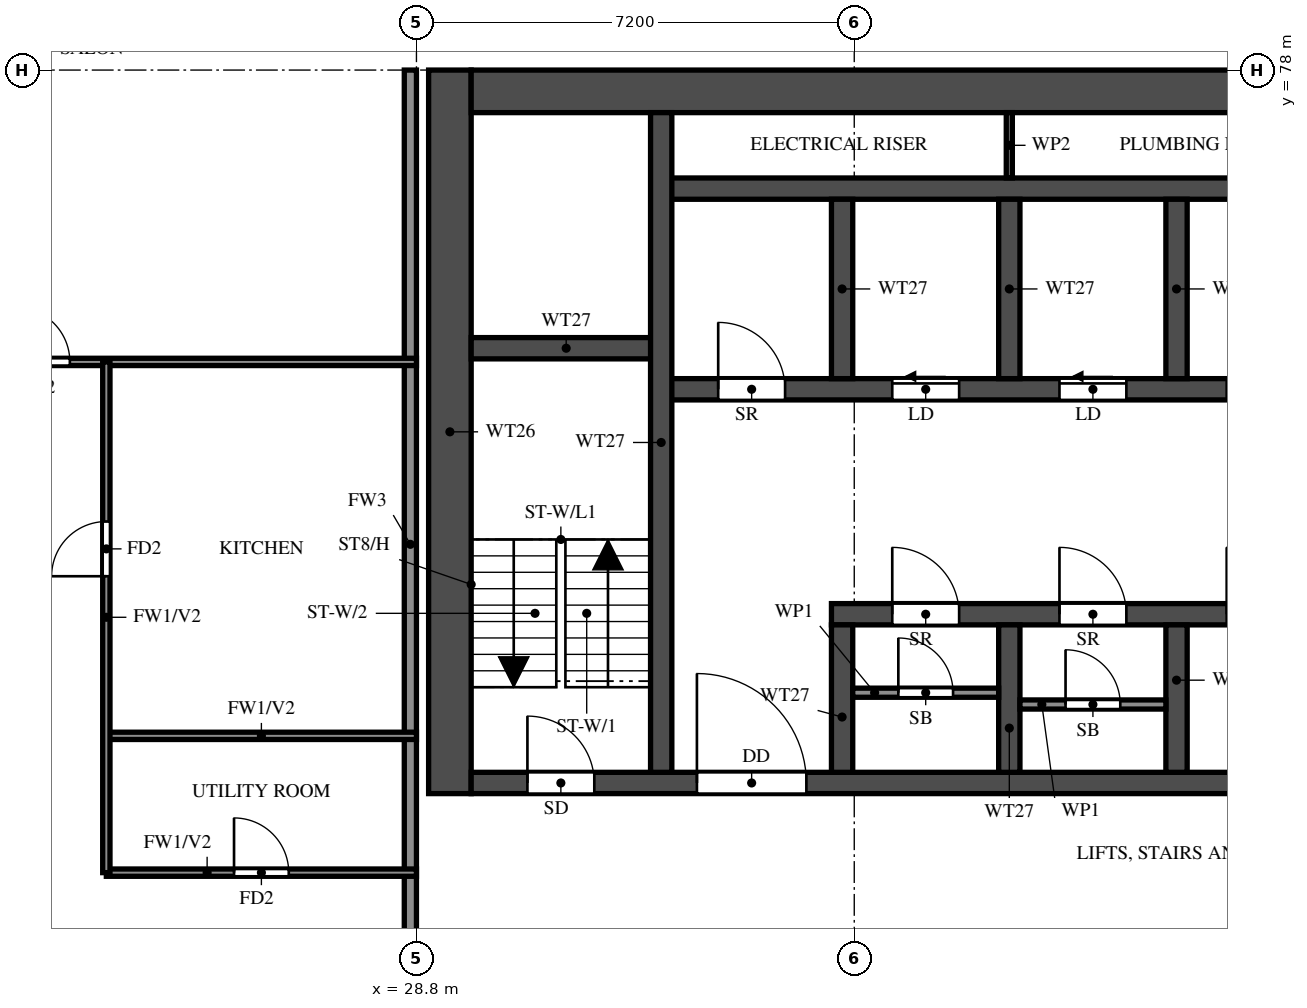
"""IFC4 building model, lengths in metres.
Left out: names, types, materials, properties, quantities, classifications, styles, units other than length and angle.
Written with IfcOpenShell. Run it as: python <this file> out.ifc"""

import sys

from ifc_helpers import new_model, si_unit, direction, frame, frame_2d, origin, place, context, subcontext, project, spatial, rectangle, extrude, element, fill, save


model = new_model("IFC4")
c1 = context("Model", 3, precision=1e-05, world=origin(), true_north=direction((0.0, 1.0)))
c2 = subcontext(c1, "Body", "Model", "MODEL_VIEW")
j1 = project(units=[si_unit("LENGTHUNIT", "METRE"), si_unit("PLANEANGLEUNIT", "RADIAN")], contexts=[c1])
p1 = place(None, origin())
s1 = spatial("IfcSite", under=j1, at=p1, CompositionType="ELEMENT")
p2 = place(p1, origin())
s2 = spatial("IfcBuilding", under=s1, at=p2, CompositionType="ELEMENT")
p3 = place(p2, frame((0.0, 0.0, 146.5)))
s3 = spatial("IfcBuildingStorey", under=s2, at=p3, CompositionType="ELEMENT", Elevation=146.5)
p4 = place(p3, frame((29.35, 66.1, 0.0), z_axis=(0.0, 0.0, 1.0), x_axis=(0.0, 1.0, 0.0)))
e1 = element("IfcWall", 1, at=p4, inside=s3, PredefinedType="SHEAR", context=c2, shape_type="SweptSolid", body=[
    extrude(rectangle(XDim=11.9, YDim=0.7, at=frame_2d((5.95, 0.0))), origin(), (0.0, 0.0, 1.0), 3.2),
])
p5 = place(p3, frame((29.7, 77.65, 0.0), z_axis=(0.0, 0.0, 1.0), x_axis=(1.0, 0.0, 0.0)))
e2 = element("IfcWall", 2, at=p5, inside=s3, PredefinedType="SHEAR", context=c2, shape_type="SweptSolid", body=[
    extrude(rectangle(XDim=41.4, YDim=0.7, at=frame_2d((20.7, 0.0))), origin(), (0.0, 0.0, 1.0), 3.2),
])
p6 = place(p3, frame((29.7, 66.275, 0.0), z_axis=(0.0, 0.0, 1.0), x_axis=(1.0, 0.0, 0.0)))
e3 = element("IfcWall", 3, at=p6, inside=s3, PredefinedType="SHEAR", context=c2, shape_type="SweptSolid", body=[
    extrude(rectangle(XDim=41.4, YDim=0.35, at=frame_2d((20.7, 0.0))), origin(), (0.0, 0.0, 1.0), 3.2),
])
p7 = place(p6, frame((0.925, 0.0, 0.0)))
e4 = element("IfcOpeningElement", 4, at=p7, cuts=e3, PredefinedType="OPENING", context=c2, shape_type="SweptSolid", body=[
    extrude(rectangle(XDim=1.1, YDim=2.1, at=frame_2d((0.55, 1.05))), frame((0.0, 0.185, 0.0), z_axis=(0.0, -1.0, 0.0), x_axis=(1.0, 0.0, 0.0)), (0.0, 0.0, 1.0), 0.37),
])
p8 = place(p6, frame((3.712, 0.0, 0.0)))
e5 = element("IfcOpeningElement", 5, at=p8, cuts=e3, PredefinedType="OPENING", context=c2, shape_type="SweptSolid", body=[
    extrude(rectangle(XDim=1.8, YDim=2.1, at=frame_2d((0.9, 1.05))), frame((0.0, 0.185, 0.0), z_axis=(0.0, -1.0, 0.0), x_axis=(1.0, 0.0, 0.0)), (0.0, 0.0, 1.0), 0.37),
])
p9 = place(p3, frame((35.625, 69.05, 0.0), z_axis=(0.0, 0.0, 1.0), x_axis=(1.0, 0.0, 0.0)))
e6 = element("IfcWall", 6, at=p9, inside=s3, PredefinedType="SHEAR", context=c2, shape_type="SweptSolid", body=[
    extrude(rectangle(XDim=24.1, YDim=0.35, at=frame_2d((12.05, 0.0))), origin(), (0.0, 0.0, 1.0), 3.2),
])
p10 = place(p9, frame((1.0, 0.0, 0.0)))
e7 = element("IfcOpeningElement", 7, at=p10, cuts=e6, PredefinedType="OPENING", context=c2, shape_type="SweptSolid", body=[
    extrude(rectangle(XDim=1.1, YDim=2.1, at=frame_2d((0.55, 1.05))), frame((0.0, 0.185, 0.0), z_axis=(0.0, -1.0, 0.0), x_axis=(1.0, 0.0, 0.0)), (0.0, 0.0, 1.0), 0.37),
])
p11 = place(p9, frame((3.75, 0.0, 0.0)))
e8 = element("IfcOpeningElement", 8, at=p11, cuts=e6, PredefinedType="OPENING", context=c2, shape_type="SweptSolid", body=[
    extrude(rectangle(XDim=1.1, YDim=2.1, at=frame_2d((0.55, 1.05))), frame((0.0, 0.185, 0.0), z_axis=(0.0, -1.0, 0.0), x_axis=(1.0, 0.0, 0.0)), (0.0, 0.0, 1.0), 0.37),
])
p12 = place(p9, frame((6.5, 0.0, 0.0)))
e9 = element("IfcOpeningElement", 9, at=p12, cuts=e6, PredefinedType="OPENING", context=c2, shape_type="SweptSolid", body=[
    extrude(rectangle(XDim=1.1, YDim=2.1, at=frame_2d((0.55, 1.05))), frame((0.0, 0.185, 0.0), z_axis=(0.0, -1.0, 0.0), x_axis=(1.0, 0.0, 0.0)), (0.0, 0.0, 1.0), 0.37),
])
p13 = place(p9, frame((9.25, 0.0, 0.0)))
e10 = element("IfcOpeningElement", 10, at=p13, cuts=e6, PredefinedType="OPENING", context=c2, shape_type="SweptSolid", body=[
    extrude(rectangle(XDim=1.1, YDim=2.1, at=frame_2d((0.55, 1.05))), frame((0.0, 0.185, 0.0), z_axis=(0.0, -1.0, 0.0), x_axis=(1.0, 0.0, 0.0)), (0.0, 0.0, 1.0), 0.37),
])
p14 = place(p9, frame((12.0, 0.0, 0.0)))
e11 = element("IfcOpeningElement", 11, at=p14, cuts=e6, PredefinedType="OPENING", context=c2, shape_type="SweptSolid", body=[
    extrude(rectangle(XDim=1.1, YDim=2.1, at=frame_2d((0.55, 1.05))), frame((0.0, 0.185, 0.0), z_axis=(0.0, -1.0, 0.0), x_axis=(1.0, 0.0, 0.0)), (0.0, 0.0, 1.0), 0.37),
])
p15 = place(p9, frame((14.75, 0.0, 0.0)))
e12 = element("IfcOpeningElement", 12, at=p15, cuts=e6, PredefinedType="OPENING", context=c2, shape_type="SweptSolid", body=[
    extrude(rectangle(XDim=1.1, YDim=2.1, at=frame_2d((0.55, 1.05))), frame((0.0, 0.185, 0.0), z_axis=(0.0, -1.0, 0.0), x_axis=(1.0, 0.0, 0.0)), (0.0, 0.0, 1.0), 0.37),
])
p16 = place(p9, frame((17.625, 0.0, 0.0)))
e13 = element("IfcOpeningElement", 13, at=p16, cuts=e6, PredefinedType="OPENING", context=c2, shape_type="SweptSolid", body=[
    extrude(rectangle(XDim=1.1, YDim=2.1, at=frame_2d((0.55, 1.05))), frame((0.0, 0.185, 0.0), z_axis=(0.0, -1.0, 0.0), x_axis=(1.0, 0.0, 0.0)), (0.0, 0.0, 1.0), 0.37),
])
p17 = place(p9, frame((20.625, 0.0, 0.0)))
e14 = element("IfcOpeningElement", 14, at=p17, cuts=e6, PredefinedType="OPENING", context=c2, shape_type="SweptSolid", body=[
    extrude(rectangle(XDim=1.1, YDim=2.1, at=frame_2d((0.55, 1.05))), frame((0.0, 0.185, 0.0), z_axis=(0.0, -1.0, 0.0), x_axis=(1.0, 0.0, 0.0)), (0.0, 0.0, 1.0), 0.37),
])
p18 = place(p3, frame((32.825, 72.75, 0.0), z_axis=(0.0, 0.0, 1.0), x_axis=(1.0, 0.0, 0.0)))
e15 = element("IfcWall", 15, at=p18, inside=s3, PredefinedType="SHEAR", context=c2, shape_type="SweptSolid", body=[
    extrude(rectangle(XDim=35.15, YDim=0.35, at=frame_2d((17.575, 0.0))), origin(), (0.0, 0.0, 1.0), 3.2),
])
p19 = place(p18, frame((19.8, 0.0, 0.0)))
e16 = element("IfcOpeningElement", 16, at=p19, cuts=e15, PredefinedType="OPENING", context=c2, shape_type="SweptSolid", body=[
    extrude(rectangle(XDim=1.1, YDim=2.1, at=frame_2d((0.55, 1.05))), frame((0.0, 0.185, 0.0), z_axis=(0.0, -1.0, 0.0), x_axis=(1.0, 0.0, 0.0)), (0.0, 0.0, 1.0), 0.37),
])
p20 = place(p18, frame((27.7, 0.0, 0.0)))
e17 = element("IfcOpeningElement", 17, at=p20, cuts=e15, PredefinedType="OPENING", context=c2, shape_type="SweptSolid", body=[
    extrude(rectangle(XDim=1.1, YDim=2.1, at=frame_2d((0.55, 1.05))), frame((0.0, 0.185, 0.0), z_axis=(0.0, -1.0, 0.0), x_axis=(1.0, 0.0, 0.0)), (0.0, 0.0, 1.0), 0.37),
])
p21 = place(p18, frame((30.3, 0.0, 0.0)))
e18 = element("IfcOpeningElement", 18, at=p21, cuts=e15, PredefinedType="OPENING", context=c2, shape_type="SweptSolid", body=[
    extrude(rectangle(XDim=1.1, YDim=2.1, at=frame_2d((0.55, 1.05))), frame((0.0, 0.185, 0.0), z_axis=(0.0, -1.0, 0.0), x_axis=(1.0, 0.0, 0.0)), (0.0, 0.0, 1.0), 0.37),
])
p22 = place(p18, frame((3.8, 0.0, 0.0)))
e19 = element("IfcOpeningElement", 19, at=p22, cuts=e15, PredefinedType="OPENING", context=c2, shape_type="SweptSolid", body=[
    extrude(rectangle(XDim=1.1, YDim=2.1, at=frame_2d((0.55, 1.05))), frame((0.0, 0.185, 0.0), z_axis=(0.0, -1.0, 0.0), x_axis=(1.0, 0.0, 0.0)), (0.0, 0.0, 1.0), 0.37),
])
p23 = place(p18, frame((6.55, 0.0, 0.0)))
e20 = element("IfcOpeningElement", 20, at=p23, cuts=e15, PredefinedType="OPENING", context=c2, shape_type="SweptSolid", body=[
    extrude(rectangle(XDim=1.1, YDim=2.1, at=frame_2d((0.55, 1.05))), frame((0.0, 0.185, 0.0), z_axis=(0.0, -1.0, 0.0), x_axis=(1.0, 0.0, 0.0)), (0.0, 0.0, 1.0), 0.37),
])
p24 = place(p18, frame((9.3, 0.0, 0.0)))
e21 = element("IfcOpeningElement", 21, at=p24, cuts=e15, PredefinedType="OPENING", context=c2, shape_type="SweptSolid", body=[
    extrude(rectangle(XDim=1.1, YDim=2.1, at=frame_2d((0.55, 1.05))), frame((0.0, 0.185, 0.0), z_axis=(0.0, -1.0, 0.0), x_axis=(1.0, 0.0, 0.0)), (0.0, 0.0, 1.0), 0.37),
])
p25 = place(p18, frame((12.05, 0.0, 0.0)))
e22 = element("IfcOpeningElement", 22, at=p25, cuts=e15, PredefinedType="OPENING", context=c2, shape_type="SweptSolid", body=[
    extrude(rectangle(XDim=1.1, YDim=2.1, at=frame_2d((0.55, 1.05))), frame((0.0, 0.185, 0.0), z_axis=(0.0, -1.0, 0.0), x_axis=(1.0, 0.0, 0.0)), (0.0, 0.0, 1.0), 0.37),
])
p26 = place(p18, frame((14.8, 0.0, 0.0)))
e23 = element("IfcOpeningElement", 23, at=p26, cuts=e15, PredefinedType="OPENING", context=c2, shape_type="SweptSolid", body=[
    extrude(rectangle(XDim=1.1, YDim=2.1, at=frame_2d((0.55, 1.05))), frame((0.0, 0.185, 0.0), z_axis=(0.0, -1.0, 0.0), x_axis=(1.0, 0.0, 0.0)), (0.0, 0.0, 1.0), 0.37),
])
p27 = place(p18, frame((17.55, 0.0, 0.0)))
e24 = element("IfcOpeningElement", 24, at=p27, cuts=e15, PredefinedType="OPENING", context=c2, shape_type="SweptSolid", body=[
    extrude(rectangle(XDim=1.1, YDim=2.1, at=frame_2d((0.55, 1.05))), frame((0.0, 0.185, 0.0), z_axis=(0.0, -1.0, 0.0), x_axis=(1.0, 0.0, 0.0)), (0.0, 0.0, 1.0), 0.37),
])
p28 = place(p18, frame((0.938, 0.0, 0.0)))
e25 = element("IfcOpeningElement", 25, at=p28, cuts=e15, PredefinedType="OPENING", context=c2, shape_type="SweptSolid", body=[
    extrude(rectangle(XDim=1.1, YDim=2.1, at=frame_2d((0.55, 1.05))), frame((0.0, 0.185, 0.0), z_axis=(0.0, -1.0, 0.0), x_axis=(1.0, 0.0, 0.0)), (0.0, 0.0, 1.0), 0.37),
])
p29 = place(p3, frame((32.825, 76.05, 0.0), z_axis=(0.0, 0.0, 1.0), x_axis=(1.0, 0.0, 0.0)))
e26 = element("IfcWall", 26, at=p29, inside=s3, PredefinedType="SHEAR", context=c2, shape_type="SweptSolid", body=[
    extrude(rectangle(XDim=35.15, YDim=0.35, at=frame_2d((17.575, 0.0))), origin(), (0.0, 0.0, 1.0), 3.2),
])
p30 = place(p3, frame((29.7, 73.425, 0.0), z_axis=(0.0, 0.0, 1.0), x_axis=(1.0, 0.0, 0.0)))
e27 = element("IfcWall", 27, at=p30, inside=s3, PredefinedType="SHEAR", context=c2, shape_type="SweptSolid", body=[
    extrude(rectangle(XDim=3.125, YDim=0.35, at=frame_2d((1.562, 0.0))), origin(), (0.0, 0.0, 1.0), 3.2),
])
p31 = place(p3, frame((32.825, 66.45, 0.0), z_axis=(0.0, 0.0, 1.0), x_axis=(0.0, 1.0, 0.0)))
e28 = element("IfcWall", 28, at=p31, inside=s3, PredefinedType="SHEAR", context=c2, shape_type="SweptSolid", body=[
    extrude(rectangle(XDim=10.85, YDim=0.35, at=frame_2d((5.425, 0.0))), origin(), (0.0, 0.0, 1.0), 3.2),
])
for number, where, z_axis, x_axis in (
    (29, (35.8, 66.45, 0.0), (0.0, 0.0, 1.0), (0.0, 1.0, 0.0)),
    (30, (38.55, 66.45, 0.0), (0.0, 0.0, 1.0), (0.0, 1.0, 0.0)),
    (31, (41.3, 66.45, 0.0), (0.0, 0.0, 1.0), (0.0, 1.0, 0.0)),
):
    element("IfcWall", number, at=place(p3, frame(where, z_axis=z_axis, x_axis=x_axis)), inside=s3, PredefinedType="SHEAR", context=c2, shape_type="SweptSolid", body=[
        extrude(rectangle(XDim=2.425, YDim=0.35, at=frame_2d((1.212, 0.0))), origin(), (0.0, 0.0, 1.0), 3.2),
    ])
for number, where, z_axis, x_axis in (
    (32, (35.8, 72.925, 0.0), (0.0, 0.0, 1.0), (0.0, 1.0, 0.0)),
    (33, (38.55, 72.925, 0.0), (0.0, 0.0, 1.0), (0.0, 1.0, 0.0)),
    (34, (41.3, 72.925, 0.0), (0.0, 0.0, 1.0), (0.0, 1.0, 0.0)),
):
    element("IfcWall", number, at=place(p3, frame(where, z_axis=z_axis, x_axis=x_axis)), inside=s3, PredefinedType="SHEAR", context=c2, shape_type="SweptSolid", body=[
        extrude(rectangle(XDim=2.95, YDim=0.35, at=frame_2d((1.475, 0.0))), origin(), (0.0, 0.0, 1.0), 3.2),
    ])
p32 = place(p3, frame((35.975, 67.76, 0.0), z_axis=(0.0, 0.0, 1.0), x_axis=(1.0, 0.0, 0.0)))
e35 = element("IfcWall", 35, at=p32, inside=s3, PredefinedType="PARTITIONING", context=c2, shape_type="SweptSolid", body=[
    extrude(rectangle(XDim=2.4, YDim=0.15, at=frame_2d((1.2, 0.0))), origin(), (0.0, 0.0, 1.0), 3.2),
])
p33 = place(p32, frame((0.75, 0.0, 0.0)))
e36 = element("IfcOpeningElement", 36, at=p33, cuts=e35, PredefinedType="OPENING", context=c2, shape_type="SweptSolid", body=[
    extrude(rectangle(XDim=0.9, YDim=2.1, at=frame_2d((0.45, 1.05))), frame((0.0, 0.085, 0.0), z_axis=(0.0, -1.0, 0.0), x_axis=(1.0, 0.0, 0.0)), (0.0, 0.0, 1.0), 0.17),
])
p34 = place(p3, frame((38.725, 67.565, 0.0), z_axis=(0.0, 0.0, 1.0), x_axis=(1.0, 0.0, 0.0)))
e37 = element("IfcWall", 37, at=p34, inside=s3, PredefinedType="PARTITIONING", context=c2, shape_type="SweptSolid", body=[
    extrude(rectangle(XDim=2.4, YDim=0.15, at=frame_2d((1.2, 0.0))), origin(), (0.0, 0.0, 1.0), 3.2),
])
p35 = place(p34, frame((0.75, 0.0, 0.0)))
e38 = element("IfcOpeningElement", 38, at=p35, cuts=e37, PredefinedType="OPENING", context=c2, shape_type="SweptSolid", body=[
    extrude(rectangle(XDim=0.9, YDim=2.1, at=frame_2d((0.45, 1.05))), frame((0.0, 0.085, 0.0), z_axis=(0.0, -1.0, 0.0), x_axis=(1.0, 0.0, 0.0)), (0.0, 0.0, 1.0), 0.17),
])
p36 = place(p3, frame((38.55, 76.225, 0.0), z_axis=(0.0, 0.0, 1.0), x_axis=(0.0, 1.0, 0.0)))
e39 = element("IfcWall", 39, at=p36, inside=s3, PredefinedType="PARTITIONING", context=c2, shape_type="SweptSolid", body=[
    extrude(rectangle(XDim=1.075, YDim=0.1, at=frame_2d((0.538, 0.0))), origin(), (0.0, 0.0, 1.0), 3.2),
])
p37 = place(p3, frame((28.7, 62.4, 0.0), z_axis=(0.0, 0.0, 1.0), x_axis=(0.0, 1.0, 0.0)))
e40 = element("IfcWall", 40, at=p37, inside=s3, PredefinedType="SOLIDWALL", context=c2, shape_type="SweptSolid", body=[
    extrude(rectangle(XDim=15.6, YDim=0.2, at=frame_2d((7.8, 0.0))), origin(), (0.0, 0.0, 1.0), 3.2),
])
p38 = place(p3, frame((23.7, 64.8, 0.0), z_axis=(0.0, 0.0, 1.0), x_axis=(1.0, 0.0, 0.0)))
e41 = element("IfcWall", 41, at=p38, inside=s3, PredefinedType="PARTITIONING", context=c2, shape_type="SweptSolid", body=[
    extrude(rectangle(XDim=5.1, YDim=0.12, at=frame_2d((2.55, 0.0))), origin(), (0.0, 0.0, 1.0), 3.2),
])
p39 = place(p38, frame((2.1, 0.0, 0.0)))
e42 = element("IfcOpeningElement", 42, at=p39, cuts=e41, PredefinedType="OPENING", context=c2, shape_type="SweptSolid", body=[
    extrude(rectangle(XDim=0.9, YDim=2.1, at=frame_2d((0.45, 1.05))), frame((0.0, 0.07, 0.0), z_axis=(0.0, -1.0, 0.0), x_axis=(1.0, 0.0, 0.0)), (0.0, 0.0, 1.0), 0.14),
])
p40 = place(p3, frame((23.7, 67.05, 0.0), z_axis=(0.0, 0.0, 1.0), x_axis=(1.0, 0.0, 0.0)))
e43 = element("IfcWall", 43, at=p40, inside=s3, PredefinedType="PARTITIONING", context=c2, shape_type="SweptSolid", body=[
    extrude(rectangle(XDim=5.1, YDim=0.12, at=frame_2d((2.55, 0.0))), origin(), (0.0, 0.0, 1.0), 3.2),
])
p41 = place(p3, frame((14.525, 73.2, 0.0), z_axis=(0.0, 0.0, 1.0), x_axis=(1.0, 0.0, 0.0)))
e44 = element("IfcWall", 44, at=p41, inside=s3, PredefinedType="PARTITIONING", context=c2, shape_type="SweptSolid", body=[
    extrude(rectangle(XDim=14.275, YDim=0.12, at=frame_2d((7.138, 0.0))), origin(), (0.0, 0.0, 1.0), 2.3),
])
p42 = place(p41, frame((7.675, 0.0, 0.0)))
e45 = element("IfcOpeningElement", 45, at=p42, cuts=e44, PredefinedType="OPENING", context=c2, shape_type="SweptSolid", body=[
    extrude(rectangle(XDim=0.9, YDim=2.1, at=frame_2d((0.45, 1.05))), frame((0.0, 0.07, 0.0), z_axis=(0.0, -1.0, 0.0), x_axis=(1.0, 0.0, 0.0)), (0.0, 0.0, 1.0), 0.14),
])
p43 = place(p3, frame((23.7, 64.8, 0.0), z_axis=(0.0, 0.0, 1.0), x_axis=(0.0, 1.0, 0.0)))
e46 = element("IfcWall", 46, at=p43, inside=s3, PredefinedType="PARTITIONING", context=c2, shape_type="SweptSolid", body=[
    extrude(rectangle(XDim=8.4, YDim=0.12, at=frame_2d((4.2, 0.0))), origin(), (0.0, 0.0, 1.0), 3.2),
])
p44 = place(p43, frame((4.875, 0.0, 0.0)))
e47 = element("IfcOpeningElement", 47, at=p44, cuts=e46, PredefinedType="OPENING", context=c2, shape_type="SweptSolid", body=[
    extrude(rectangle(XDim=0.9, YDim=2.1, at=frame_2d((0.45, 1.05))), frame((0.0, 0.07, 0.0), z_axis=(0.0, -1.0, 0.0), x_axis=(1.0, 0.0, 0.0)), (0.0, 0.0, 1.0), 0.14),
])
p45 = place(p7, origin())
e48 = element("IfcDoor", 48, at=p45, inside=s3, OperationType="SINGLE_SWING_LEFT", PredefinedType="DOOR", context=c2, shape_type="SweptSolid", body=[
    extrude(rectangle(XDim=1.1, YDim=2.1, at=frame_2d((0.55, 1.05))), frame((0.0, 0.025, 0.0), z_axis=(0.0, -1.0, 0.0), x_axis=(1.0, 0.0, 0.0)), (0.0, 0.0, 1.0), 0.05),
])
fill(e4, e48)
p46 = place(p8, origin())
e49 = element("IfcDoor", 49, at=p46, inside=s3, OperationType="DOUBLE_DOOR_SINGLE_SWING", PredefinedType="DOOR", context=c2, shape_type="SweptSolid", body=[
    extrude(rectangle(XDim=1.8, YDim=2.1, at=frame_2d((0.9, 1.05))), frame((0.0, 0.025, 0.0), z_axis=(0.0, -1.0, 0.0), x_axis=(1.0, 0.0, 0.0)), (0.0, 0.0, 1.0), 0.05),
])
fill(e5, e49)
p47 = place(p10, origin())
e50 = element("IfcDoor", 50, at=p47, inside=s3, OperationType="SINGLE_SWING_RIGHT", PredefinedType="DOOR", context=c2, shape_type="SweptSolid", body=[
    extrude(rectangle(XDim=1.1, YDim=2.1, at=frame_2d((0.55, 1.05))), frame((0.0, 0.025, 0.0), z_axis=(0.0, -1.0, 0.0), x_axis=(1.0, 0.0, 0.0)), (0.0, 0.0, 1.0), 0.05),
])
fill(e7, e50)
p48 = place(p33, origin())
e51 = element("IfcDoor", 51, at=p48, inside=s3, OperationType="SINGLE_SWING_LEFT", PredefinedType="DOOR", context=c2, shape_type="SweptSolid", body=[
    extrude(rectangle(XDim=0.9, YDim=2.1, at=frame_2d((0.45, 1.05))), frame((0.0, 0.025, 0.0), z_axis=(0.0, -1.0, 0.0), x_axis=(1.0, 0.0, 0.0)), (0.0, 0.0, 1.0), 0.05),
])
fill(e36, e51)
p49 = place(p11, origin())
e52 = element("IfcDoor", 52, at=p49, inside=s3, OperationType="SINGLE_SWING_LEFT", PredefinedType="DOOR", context=c2, shape_type="SweptSolid", body=[
    extrude(rectangle(XDim=1.1, YDim=2.1, at=frame_2d((0.55, 1.05))), frame((0.0, 0.025, 0.0), z_axis=(0.0, -1.0, 0.0), x_axis=(1.0, 0.0, 0.0)), (0.0, 0.0, 1.0), 0.05),
])
fill(e8, e52)
p50 = place(p35, origin())
e53 = element("IfcDoor", 53, at=p50, inside=s3, OperationType="SINGLE_SWING_LEFT", PredefinedType="DOOR", context=c2, shape_type="SweptSolid", body=[
    extrude(rectangle(XDim=0.9, YDim=2.1, at=frame_2d((0.45, 1.05))), frame((0.0, 0.025, 0.0), z_axis=(0.0, -1.0, 0.0), x_axis=(1.0, 0.0, 0.0)), (0.0, 0.0, 1.0), 0.05),
])
fill(e38, e53)
p51 = place(p22, origin())
e54 = element("IfcDoor", 54, at=p51, inside=s3, OperationType="SLIDING_TO_LEFT", PredefinedType="DOOR", context=c2, shape_type="SweptSolid", body=[
    extrude(rectangle(XDim=1.1, YDim=2.1, at=frame_2d((0.55, 1.05))), frame((0.0, 0.025, 0.0), z_axis=(0.0, -1.0, 0.0), x_axis=(1.0, 0.0, 0.0)), (0.0, 0.0, 1.0), 0.05),
])
fill(e19, e54)
p52 = place(p23, origin())
e55 = element("IfcDoor", 55, at=p52, inside=s3, OperationType="SLIDING_TO_LEFT", PredefinedType="DOOR", context=c2, shape_type="SweptSolid", body=[
    extrude(rectangle(XDim=1.1, YDim=2.1, at=frame_2d((0.55, 1.05))), frame((0.0, 0.025, 0.0), z_axis=(0.0, -1.0, 0.0), x_axis=(1.0, 0.0, 0.0)), (0.0, 0.0, 1.0), 0.05),
])
fill(e20, e55)
p53 = place(p28, origin())
e56 = element("IfcDoor", 56, at=p53, inside=s3, OperationType="SINGLE_SWING_LEFT", PredefinedType="DOOR", context=c2, shape_type="SweptSolid", body=[
    extrude(rectangle(XDim=1.1, YDim=2.1, at=frame_2d((0.55, 1.05))), frame((0.0, 0.025, 0.0), z_axis=(0.0, -1.0, 0.0), x_axis=(1.0, 0.0, 0.0)), (0.0, 0.0, 1.0), 0.05),
])
fill(e25, e56)
p54 = place(p42, origin())
e57 = element("IfcDoor", 57, at=p54, inside=s3, OperationType="SINGLE_SWING_LEFT", PredefinedType="DOOR", context=c2, shape_type="SweptSolid", body=[
    extrude(rectangle(XDim=0.9, YDim=2.1, at=frame_2d((0.45, 1.05))), frame((0.0, 0.025, 0.0), z_axis=(0.0, -1.0, 0.0), x_axis=(1.0, 0.0, 0.0)), (0.0, 0.0, 1.0), 0.05),
])
fill(e45, e57)
p55 = place(p39, origin())
e58 = element("IfcDoor", 58, at=p55, inside=s3, OperationType="SINGLE_SWING_LEFT", PredefinedType="DOOR", context=c2, shape_type="SweptSolid", body=[
    extrude(rectangle(XDim=0.9, YDim=2.1, at=frame_2d((0.45, 1.05))), frame((0.0, 0.025, 0.0), z_axis=(0.0, -1.0, 0.0), x_axis=(1.0, 0.0, 0.0)), (0.0, 0.0, 1.0), 0.05),
])
fill(e42, e58)
p56 = place(p44, origin())
e59 = element("IfcDoor", 59, at=p56, inside=s3, OperationType="SINGLE_SWING_RIGHT", PredefinedType="DOOR", context=c2, shape_type="SweptSolid", body=[
    extrude(rectangle(XDim=0.9, YDim=2.1, at=frame_2d((0.45, 1.05))), frame((0.0, 0.025, 0.0), z_axis=(0.0, -1.0, 0.0), x_axis=(1.0, 0.0, 0.0)), (0.0, 0.0, 1.0), 0.05),
])
fill(e47, e59)
save(model, sys.argv[1])
